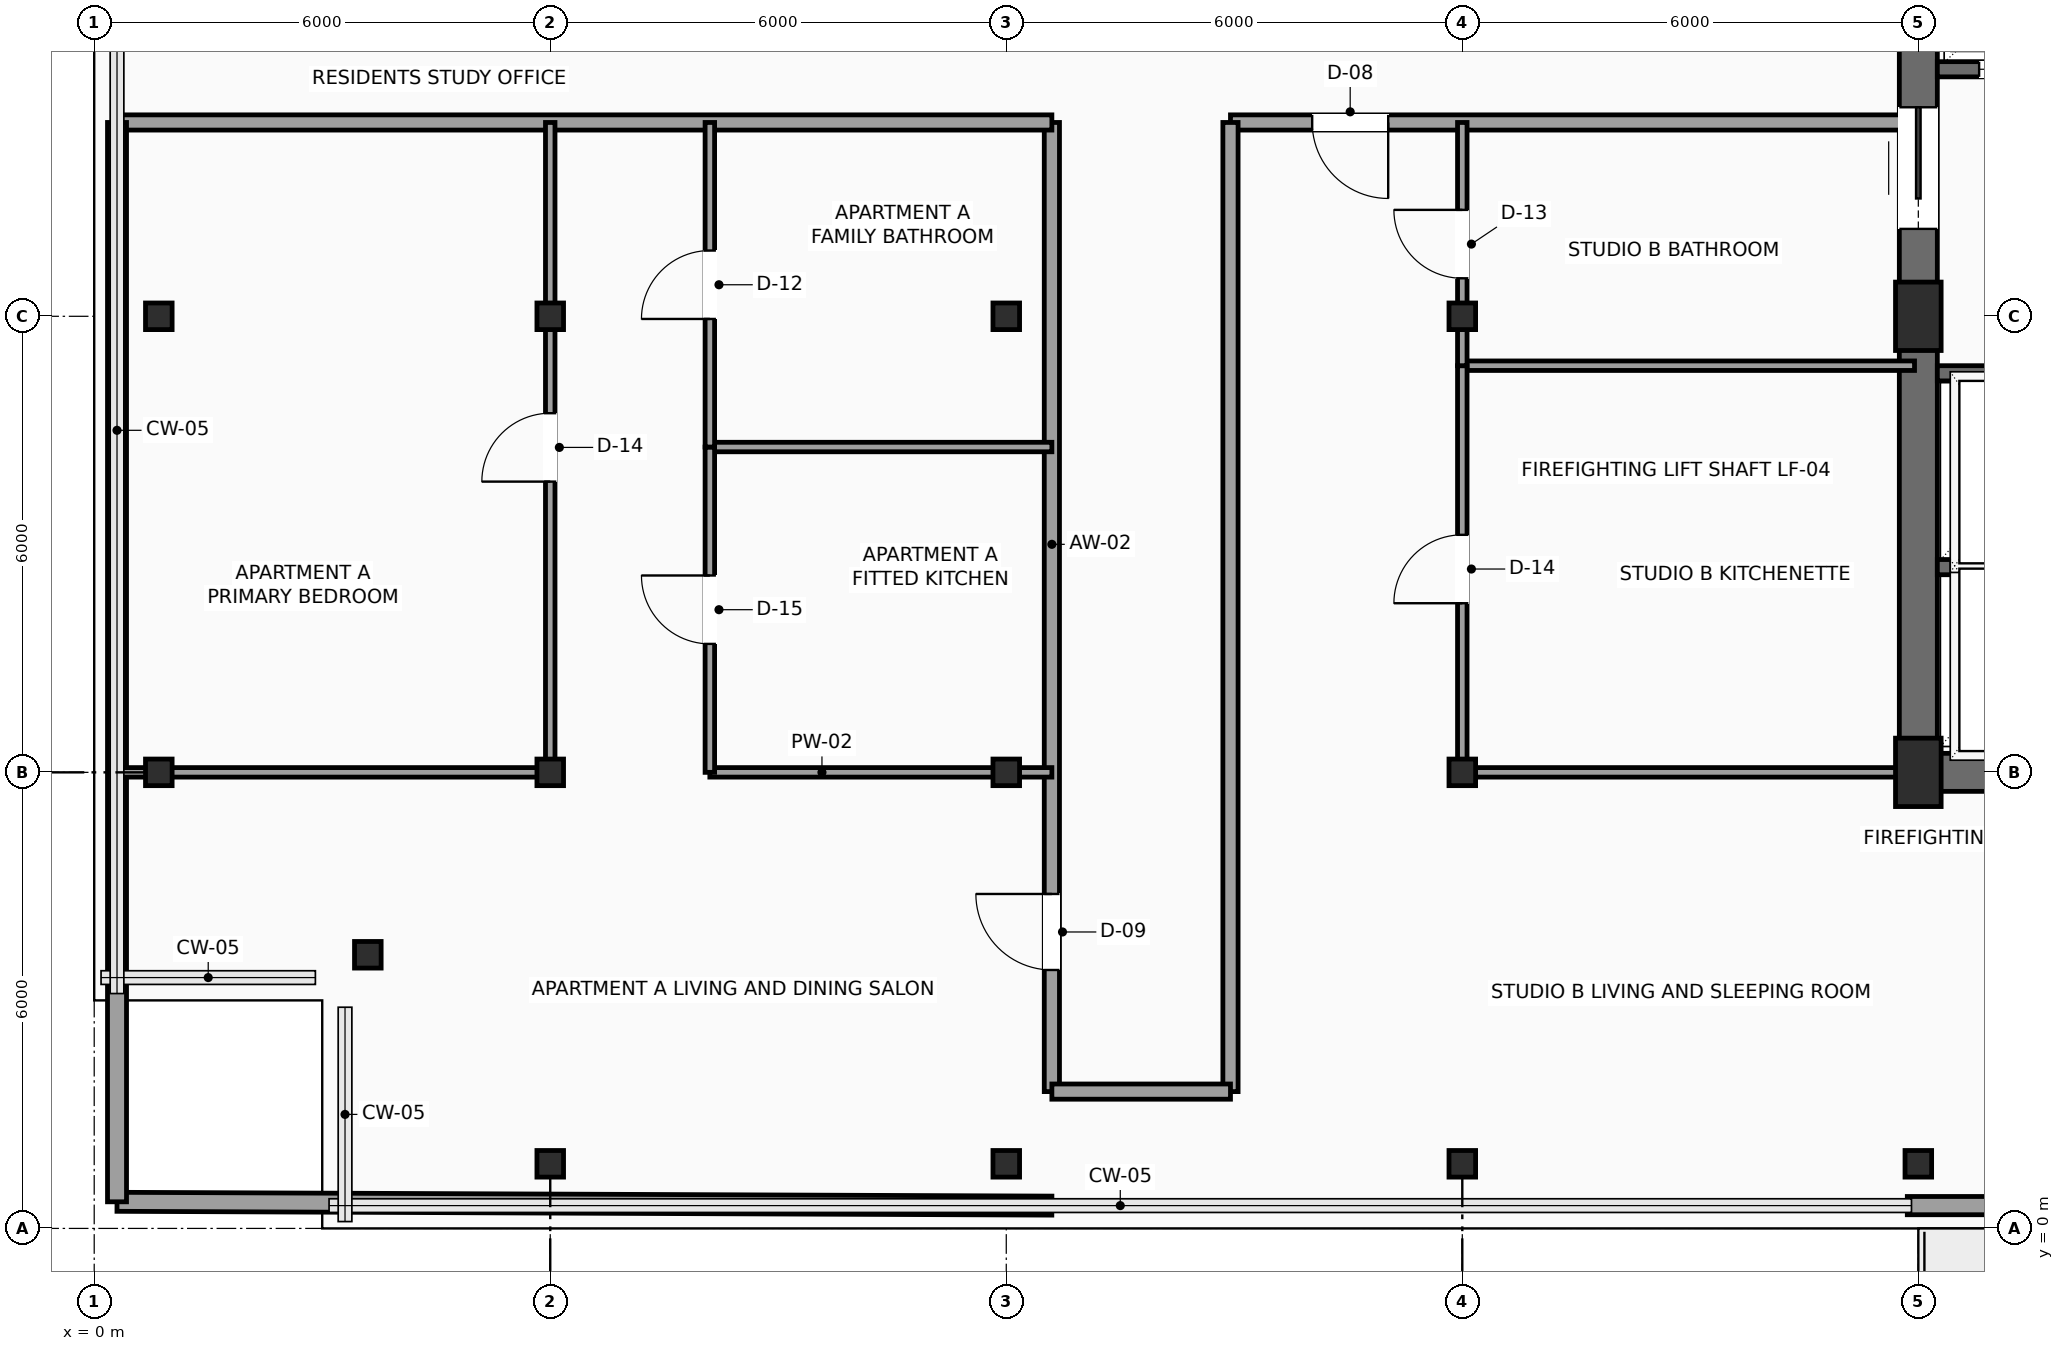
"""IFC4 building model, lengths in metres.
Left out: names, types, materials, properties, quantities, classifications, styles, units other than length and angle.
Written with IfcOpenShell. Run it as: python <this file> out.ifc"""

import sys

from ifc_helpers import new_model, si_unit, direction, frame, frame_2d, origin, origin_2d, place, context, subcontext, project, spatial, rectangle, hollow_rectangle, extrude, element, fill, save


model = new_model("IFC4")
c1 = context("Model", 3, precision=1e-05, world=origin(), true_north=direction((0.0, 1.0)))
c2 = subcontext(c1, "Body", "Model", "MODEL_VIEW")
j1 = project(units=[si_unit("LENGTHUNIT", "METRE"), si_unit("PLANEANGLEUNIT", "RADIAN")], contexts=[c1])
p1 = place(None, origin())
s1 = spatial("IfcSite", under=j1, at=p1, CompositionType="ELEMENT")
p2 = place(p1, origin())
s2 = spatial("IfcBuilding", under=s1, at=p2, CompositionType="ELEMENT")
p3 = place(p2, frame((0.0, 0.0, 243.2)))
s3 = spatial("IfcBuildingStorey", under=s2, at=p3, CompositionType="ELEMENT", Elevation=243.2)
for number, where, z_axis, x_axis in (
    (1, (24.0, 6.0, 0.0), (0.0, 0.0, 1.0), (1.0, 0.0, 0.0)),
    (2, (24.0, 12.0, 0.0), (0.0, 0.0, 1.0), (1.0, 0.0, 0.0)),
):
    element("IfcColumn", number, at=place(p3, frame(where, z_axis=z_axis, x_axis=x_axis)), inside=s3, PredefinedType="COLUMN", context=c2, shape_type="SweptSolid", body=[
        extrude(rectangle(XDim=0.6, YDim=0.9, at=origin_2d()), origin(), (0.0, 0.0, 1.0), 3.5),
    ])
for number, where, z_axis, x_axis in (
    (3, (3.6, 3.6, 0.0), (0.0, 0.0, 1.0), (1.0, 0.0, 0.0)),
    (4, (0.85, 6.0, 0.0), (0.0, 0.0, 1.0), (1.0, 0.0, 0.0)),
    (5, (0.85, 12.0, 0.0), (0.0, 0.0, 1.0), (1.0, 0.0, 0.0)),
    (6, (6.0, 0.85, 0.0), (0.0, 0.0, 1.0), (1.0, 0.0, 0.0)),
    (7, (6.0, 6.0, 0.0), (0.0, 0.0, 1.0), (1.0, 0.0, 0.0)),
    (8, (6.0, 12.0, 0.0), (0.0, 0.0, 1.0), (1.0, 0.0, 0.0)),
    (9, (12.0, 0.85, 0.0), (0.0, 0.0, 1.0), (1.0, 0.0, 0.0)),
    (10, (12.0, 6.0, 0.0), (0.0, 0.0, 1.0), (1.0, 0.0, 0.0)),
    (11, (12.0, 12.0, 0.0), (0.0, 0.0, 1.0), (1.0, 0.0, 0.0)),
    (12, (18.0, 0.85, 0.0), (0.0, 0.0, 1.0), (1.0, 0.0, 0.0)),
    (13, (18.0, 6.0, 0.0), (0.0, 0.0, 1.0), (1.0, 0.0, 0.0)),
    (14, (18.0, 12.0, 0.0), (0.0, 0.0, 1.0), (1.0, 0.0, 0.0)),
    (15, (24.0, 0.85, 0.0), (0.0, 0.0, 1.0), (1.0, 0.0, 0.0)),
):
    element("IfcColumn", number, at=place(p3, frame(where, z_axis=z_axis, x_axis=x_axis)), inside=s3, PredefinedType="COLUMN", context=c2, shape_type="SweptSolid", body=[
        extrude(hollow_rectangle(XDim=0.35, YDim=0.35, WallThickness=0.016, InnerFilletRadius=0.016, OuterFilletRadius=0.032, at=origin_2d()), origin(), (0.0, 0.0, 1.0), 3.5),
    ])
p4 = place(p3, frame((33.145, 0.3, 0.0), z_axis=(0.0, 0.0, 1.0), x_axis=(-1.0, 0.0, 0.0)))
e16 = element("IfcWall", 16, at=p4, inside=s3, PredefinedType="SOLIDWALL", context=c2, shape_type="SweptSolid", body=[
    extrude(rectangle(XDim=9.29, YDim=0.24, at=frame_2d((4.645, 0.0))), origin(), (0.0, 0.0, 1.0), 3.3),
])
p5 = place(p4, frame((3.945, 0.0, 0.0)))
e17 = element("IfcOpeningElement", 17, at=p5, cuts=e16, PredefinedType="OPENING", context=c2, shape_type="SweptSolid", body=[
    extrude(rectangle(XDim=1.05, YDim=2.2, at=frame_2d((0.525, 1.1))), frame((0.0, 0.13, 0.0), z_axis=(0.0, -1.0, 0.0), x_axis=(1.0, 0.0, 0.0)), (0.0, 0.0, 1.0), 0.26),
])
p6 = place(p4, frame((5.345, 0.0, 0.6)))
e18 = element("IfcOpeningElement", 18, at=p6, cuts=e16, PredefinedType="OPENING", context=c2, shape_type="SweptSolid", body=[
    extrude(rectangle(XDim=2.7, YDim=2.3, at=frame_2d((1.35, 1.15))), frame((0.0, 0.13, 0.0), z_axis=(0.0, -1.0, 0.0), x_axis=(1.0, 0.0, 0.0)), (0.0, 0.0, 1.0), 0.26),
])
p7 = place(p4, frame((1.4, 0.0, 0.6)))
e19 = element("IfcOpeningElement", 19, at=p7, cuts=e16, PredefinedType="OPENING", context=c2, shape_type="SweptSolid", body=[
    extrude(rectangle(XDim=0.9, YDim=2.2, at=frame_2d((0.45, 1.1))), frame((0.0, 0.13, 0.0), z_axis=(0.0, -1.0, 0.0), x_axis=(1.0, 0.0, 0.0)), (0.0, 0.0, 1.0), 0.26),
])
p8 = place(p3, frame((24.0, 6.0, 0.0), z_axis=(0.0, 0.0, 1.0), x_axis=(1.0, 0.0, 0.0)))
e20 = element("IfcWall", 20, at=p8, inside=s3, PredefinedType="SHEAR", context=c2, shape_type="SweptSolid", body=[
    extrude(rectangle(XDim=9.6, YDim=0.5, at=frame_2d((4.8, 0.0))), origin(), (0.0, 0.0, 1.0), 3.3),
])
p9 = place(p3, frame((24.0, 6.0, 0.0), z_axis=(0.0, 0.0, 1.0), x_axis=(0.0, 1.0, 0.0)))
e21 = element("IfcWall", 21, at=p9, inside=s3, PredefinedType="SHEAR", context=c2, shape_type="SweptSolid", body=[
    extrude(rectangle(XDim=12.0, YDim=0.5, at=frame_2d((6.0, 0.0))), origin(), (0.0, 0.0, 1.0), 3.3),
])
p10 = place(p9, frame((7.15, 0.0, 0.0)))
e22 = element("IfcOpeningElement", 22, at=p10, cuts=e21, PredefinedType="OPENING", context=c2, shape_type="SweptSolid", body=[
    extrude(rectangle(XDim=1.6, YDim=2.3, at=frame_2d((0.8, 1.15))), frame((0.0, 0.26, 0.0), z_axis=(0.0, -1.0, 0.0), x_axis=(1.0, 0.0, 0.0)), (0.0, 0.0, 1.0), 0.52),
])
for number, where, z_axis, x_axis in (
    (23, (24.25, 8.7, 0.0), (0.0, 0.0, 1.0), (1.0, 0.0, 0.0)),
    (24, (24.25, 11.25, 0.0), (0.0, 0.0, 1.0), (1.0, 0.0, 0.0)),
):
    element("IfcWall", number, at=place(p3, frame(where, z_axis=z_axis, x_axis=x_axis)), inside=s3, PredefinedType="SHEAR", context=c2, shape_type="SweptSolid", body=[
        extrude(rectangle(XDim=2.17, YDim=0.2, at=frame_2d((1.085, 0.0))), origin(), (0.0, 0.0, 1.0), 3.3),
    ])
p11 = place(p3, frame((24.25, 15.25, 0.0), z_axis=(0.0, 0.0, 1.0), x_axis=(1.0, 0.0, 0.0)))
e25 = element("IfcWall", 25, at=p11, inside=s3, PredefinedType="SHEAR", context=c2, shape_type="SweptSolid", body=[
    extrude(rectangle(XDim=5.2, YDim=0.2, at=frame_2d((2.6, 0.0))), origin(), (0.0, 0.0, 1.0), 3.3),
])
p12 = place(p11, frame((0.55, 0.0, 0.0)))
e26 = element("IfcOpeningElement", 26, at=p12, cuts=e25, PredefinedType="OPENING", context=c2, shape_type="SweptSolid", body=[
    extrude(rectangle(XDim=1.2, YDim=2.2, at=frame_2d((0.6, 1.1))), frame((0.0, 0.11, 0.0), z_axis=(0.0, -1.0, 0.0), x_axis=(1.0, 0.0, 0.0)), (0.0, 0.0, 1.0), 0.22),
])
p13 = place(p11, frame((3.15, 0.0, 0.0)))
e27 = element("IfcOpeningElement", 27, at=p13, cuts=e25, PredefinedType="OPENING", context=c2, shape_type="SweptSolid", body=[
    extrude(rectangle(XDim=1.2, YDim=2.2, at=frame_2d((0.6, 1.1))), frame((0.0, 0.11, 0.0), z_axis=(0.0, -1.0, 0.0), x_axis=(1.0, 0.0, 0.0)), (0.0, 0.0, 1.0), 0.22),
])
p14 = place(p3, frame((12.6, 1.8, 0.0), z_axis=(0.0, 0.0, 1.0), x_axis=(0.0, 1.0, 0.0)))
e28 = element("IfcWall", 28, at=p14, inside=s3, PredefinedType="PARTITIONING", context=c2, shape_type="SweptSolid", body=[
    extrude(rectangle(XDim=12.75, YDim=0.2, at=frame_2d((6.375, 0.0))), origin(), (0.0, 0.0, 1.0), 3.3),
])
p15 = place(p14, frame((1.6, 0.0, 0.0)))
e29 = element("IfcOpeningElement", 29, at=p15, cuts=e28, PredefinedType="OPENING", context=c2, shape_type="SweptSolid", body=[
    extrude(rectangle(XDim=1.0, YDim=2.2, at=frame_2d((0.5, 1.1))), frame((0.0, 0.11, 0.0), z_axis=(0.0, -1.0, 0.0), x_axis=(1.0, 0.0, 0.0)), (0.0, 0.0, 1.0), 0.22),
])
p16 = place(p3, frame((12.6, 14.55, 0.0), z_axis=(0.0, 0.0, 1.0), x_axis=(-1.0, 0.0, 0.0)))
e30 = element("IfcWall", 30, at=p16, inside=s3, PredefinedType="PARTITIONING", context=c2, shape_type="SweptSolid", body=[
    extrude(rectangle(XDim=12.3, YDim=0.2, at=frame_2d((6.15, 0.0))), origin(), (0.0, 0.0, 1.0), 3.3),
])
p17 = place(p3, frame((23.95, 14.55, 0.0), z_axis=(0.0, 0.0, 1.0), x_axis=(-1.0, 0.0, 0.0)))
e31 = element("IfcWall", 31, at=p17, inside=s3, PredefinedType="PARTITIONING", context=c2, shape_type="SweptSolid", body=[
    extrude(rectangle(XDim=9.0, YDim=0.2, at=frame_2d((4.5, 0.0))), origin(), (0.0, 0.0, 1.0), 3.3),
])
p18 = place(p17, frame((6.925, 0.0, 0.0)))
e32 = element("IfcOpeningElement", 32, at=p18, cuts=e31, PredefinedType="OPENING", context=c2, shape_type="SweptSolid", body=[
    extrude(rectangle(XDim=1.0, YDim=2.2, at=frame_2d((0.5, 1.1))), frame((0.0, 0.11, 0.0), z_axis=(0.0, -1.0, 0.0), x_axis=(1.0, 0.0, 0.0)), (0.0, 0.0, 1.0), 0.22),
])
p19 = place(p3, frame((14.95, 14.55, 0.0), z_axis=(0.0, 0.0, 1.0), x_axis=(0.0, -1.0, 0.0)))
e33 = element("IfcWall", 33, at=p19, inside=s3, PredefinedType="PARTITIONING", context=c2, shape_type="SweptSolid", body=[
    extrude(rectangle(XDim=12.75, YDim=0.2, at=frame_2d((6.375, 0.0))), origin(), (0.0, 0.0, 1.0), 3.3),
])
p20 = place(p3, frame((14.95, 1.8, 0.0), z_axis=(0.0, 0.0, 1.0), x_axis=(-1.0, 0.0, 0.0)))
e34 = element("IfcWall", 34, at=p20, inside=s3, PredefinedType="PARTITIONING", context=c2, shape_type="SweptSolid", body=[
    extrude(rectangle(XDim=2.35, YDim=0.2, at=frame_2d((1.175, 0.0))), origin(), (0.0, 0.0, 1.0), 3.3),
])
p21 = place(p3, frame((0.3, 0.35, 0.0), z_axis=(0.0, 0.0, 1.0), x_axis=(0.999991721746, -0.00406896058, 0.0)))
e35 = element("IfcWall", 35, at=p21, inside=s3, PredefinedType="PARTITIONING", context=c2, shape_type="SweptSolid", body=[
    extrude(rectangle(XDim=12.3, YDim=0.25, at=frame_2d((6.15, 0.0))), origin(), (0.0, 0.0, 1.0), 3.3),
])
p22 = place(p3, frame((0.3, 0.35, 0.0), z_axis=(0.0, 0.0, 1.0), x_axis=(0.0, 1.0, 0.0)))
e36 = element("IfcWall", 36, at=p22, inside=s3, PredefinedType="PARTITIONING", context=c2, shape_type="SweptSolid", body=[
    extrude(rectangle(XDim=14.2, YDim=0.25, at=frame_2d((7.1, 0.0))), origin(), (0.0, 0.0, 1.0), 3.3),
])
p23 = place(p3, frame((8.1, 6.0, 0.0), z_axis=(0.0, 0.0, 1.0), x_axis=(1.0, 0.0, 0.0)))
e37 = element("IfcWall", 37, at=p23, inside=s3, PredefinedType="PARTITIONING", context=c2, shape_type="SweptSolid", body=[
    extrude(rectangle(XDim=4.5, YDim=0.125, at=frame_2d((2.25, 0.0))), origin(), (0.0, 0.0, 1.0), 2.992),
])
p24 = place(p3, frame((8.1, 10.28, 0.0), z_axis=(0.0, 0.0, 1.0), x_axis=(1.0, 0.0, 0.0)))
e38 = element("IfcWall", 38, at=p24, inside=s3, PredefinedType="PARTITIONING", context=c2, shape_type="SweptSolid", body=[
    extrude(rectangle(XDim=4.5, YDim=0.125, at=frame_2d((2.25, 0.0))), origin(), (0.0, 0.0, 1.0), 3.3),
])
p25 = place(p3, frame((8.1, 6.0, 0.0), z_axis=(0.0, 0.0, 1.0), x_axis=(0.0, 1.0, 0.0)))
e39 = element("IfcWall", 39, at=p25, inside=s3, PredefinedType="PARTITIONING", context=c2, shape_type="SweptSolid", body=[
    extrude(rectangle(XDim=4.28, YDim=0.125, at=frame_2d((2.14, 0.0))), origin(), (0.0, 0.0, 1.0), 3.3),
])
p26 = place(p25, frame((1.69, 0.0, 0.0)))
e40 = element("IfcOpeningElement", 40, at=p26, cuts=e39, PredefinedType="OPENING", context=c2, shape_type="SweptSolid", body=[
    extrude(rectangle(XDim=0.9, YDim=2.1, at=frame_2d((0.45, 1.05))), frame((0.0, 0.073, 0.0), z_axis=(0.0, -1.0, 0.0), x_axis=(1.0, 0.0, 0.0)), (0.0, 0.0, 1.0), 0.145),
])
p27 = place(p3, frame((8.1, 10.28, 0.0), z_axis=(0.0, 0.0, 1.0), x_axis=(0.0, 1.0, 0.0)))
e41 = element("IfcWall", 41, at=p27, inside=s3, PredefinedType="PARTITIONING", context=c2, shape_type="SweptSolid", body=[
    extrude(rectangle(XDim=4.27, YDim=0.125, at=frame_2d((2.135, 0.0))), origin(), (0.0, 0.0, 1.0), 3.3),
])
p28 = place(p27, frame((1.685, 0.0, 0.0)))
e42 = element("IfcOpeningElement", 42, at=p28, cuts=e41, PredefinedType="OPENING", context=c2, shape_type="SweptSolid", body=[
    extrude(rectangle(XDim=0.9, YDim=2.1, at=frame_2d((0.45, 1.05))), frame((0.0, 0.073, 0.0), z_axis=(0.0, -1.0, 0.0), x_axis=(1.0, 0.0, 0.0)), (0.0, 0.0, 1.0), 0.145),
])
p29 = place(p3, frame((0.3, 6.0, 0.0), z_axis=(0.0, 0.0, 1.0), x_axis=(1.0, 0.0, 0.0)))
e43 = element("IfcWall", 43, at=p29, inside=s3, PredefinedType="PARTITIONING", context=c2, shape_type="SweptSolid", body=[
    extrude(rectangle(XDim=5.7, YDim=0.125, at=frame_2d((2.85, 0.0))), origin(), (0.0, 0.0, 1.0), 2.992),
])
p30 = place(p3, frame((6.0, 6.0, 0.0), z_axis=(0.0, 0.0, 1.0), x_axis=(0.0, 1.0, 0.0)))
e44 = element("IfcWall", 44, at=p30, inside=s3, PredefinedType="PARTITIONING", context=c2, shape_type="SweptSolid", body=[
    extrude(rectangle(XDim=8.55, YDim=0.125, at=frame_2d((4.275, 0.0))), origin(), (0.0, 0.0, 1.0), 2.992),
])
p31 = place(p30, frame((3.825, 0.0, 0.0)))
e45 = element("IfcOpeningElement", 45, at=p31, cuts=e44, PredefinedType="OPENING", context=c2, shape_type="SweptSolid", body=[
    extrude(rectangle(XDim=0.9, YDim=2.1, at=frame_2d((0.45, 1.05))), frame((0.0, 0.073, 0.0), z_axis=(0.0, -1.0, 0.0), x_axis=(1.0, 0.0, 0.0)), (0.0, 0.0, 1.0), 0.145),
])
p32 = place(p3, frame((18.0, 6.0, 0.0), z_axis=(0.0, 0.0, 1.0), x_axis=(1.0, 0.0, 0.0)))
e46 = element("IfcWall", 46, at=p32, inside=s3, PredefinedType="PARTITIONING", context=c2, shape_type="SweptSolid", body=[
    extrude(rectangle(XDim=5.95, YDim=0.125, at=frame_2d((2.975, 0.0))), origin(), (0.0, 0.0, 1.0), 2.992),
])
p33 = place(p3, frame((18.0, 11.35, 0.0), z_axis=(0.0, 0.0, 1.0), x_axis=(1.0, 0.0, 0.0)))
e47 = element("IfcWall", 47, at=p33, inside=s3, PredefinedType="PARTITIONING", context=c2, shape_type="SweptSolid", body=[
    extrude(rectangle(XDim=5.95, YDim=0.125, at=frame_2d((2.975, 0.0))), origin(), (0.0, 0.0, 1.0), 3.3),
])
p34 = place(p3, frame((18.0, 6.0, 0.0), z_axis=(0.0, 0.0, 1.0), x_axis=(0.0, 1.0, 0.0)))
e48 = element("IfcWall", 48, at=p34, inside=s3, PredefinedType="PARTITIONING", context=c2, shape_type="SweptSolid", body=[
    extrude(rectangle(XDim=5.35, YDim=0.125, at=frame_2d((2.675, 0.0))), origin(), (0.0, 0.0, 1.0), 2.992),
])
p35 = place(p34, frame((2.225, 0.0, 0.0)))
e49 = element("IfcOpeningElement", 49, at=p35, cuts=e48, PredefinedType="OPENING", context=c2, shape_type="SweptSolid", body=[
    extrude(rectangle(XDim=0.9, YDim=2.1, at=frame_2d((0.45, 1.05))), frame((0.0, 0.073, 0.0), z_axis=(0.0, -1.0, 0.0), x_axis=(1.0, 0.0, 0.0)), (0.0, 0.0, 1.0), 0.145),
])
p36 = place(p3, frame((18.0, 11.35, 0.0), z_axis=(0.0, 0.0, 1.0), x_axis=(0.0, 1.0, 0.0)))
e50 = element("IfcWall", 50, at=p36, inside=s3, PredefinedType="PARTITIONING", context=c2, shape_type="SweptSolid", body=[
    extrude(rectangle(XDim=3.2, YDim=0.125, at=frame_2d((1.6, 0.0))), origin(), (0.0, 0.0, 1.0), 2.992),
])
p37 = place(p36, frame((1.15, 0.0, 0.0)))
e51 = element("IfcOpeningElement", 51, at=p37, cuts=e50, PredefinedType="OPENING", context=c2, shape_type="SweptSolid", body=[
    extrude(rectangle(XDim=0.9, YDim=2.1, at=frame_2d((0.45, 1.05))), frame((0.0, 0.073, 0.0), z_axis=(0.0, -1.0, 0.0), x_axis=(1.0, 0.0, 0.0)), (0.0, 0.0, 1.0), 0.145),
])
p38 = place(p10, origin())
e52 = element("IfcDoor", 52, at=p38, inside=s3, OperationType="DOUBLE_DOOR_SLIDING", PredefinedType="DOOR", context=c2, shape_type="SweptSolid", body=[
    extrude(rectangle(XDim=1.6, YDim=2.3, at=frame_2d((0.8, 1.15))), frame((0.0, 0.025, 0.0), z_axis=(0.0, -1.0, 0.0), x_axis=(1.0, 0.0, 0.0)), (0.0, 0.0, 1.0), 0.05),
])
fill(e22, e52)
p39 = place(p12, origin())
e53 = element("IfcDoor", 53, at=p39, inside=s3, OperationType="SLIDING_TO_RIGHT", PredefinedType="DOOR", context=c2, shape_type="SweptSolid", body=[
    extrude(rectangle(XDim=1.2, YDim=2.2, at=frame_2d((0.6, 1.1))), frame((0.0, 0.025, 0.0), z_axis=(0.0, -1.0, 0.0), x_axis=(1.0, 0.0, 0.0)), (0.0, 0.0, 1.0), 0.05),
])
fill(e26, e53)
p40 = place(p15, origin())
e54 = element("IfcDoor", 54, at=p40, inside=s3, OperationType="SINGLE_SWING_RIGHT", PredefinedType="DOOR", context=c2, shape_type="SweptSolid", body=[
    extrude(rectangle(XDim=1.0, YDim=2.2, at=frame_2d((0.5, 1.1))), frame((0.0, 0.025, 0.0), z_axis=(0.0, -1.0, 0.0), x_axis=(1.0, 0.0, 0.0)), (0.0, 0.0, 1.0), 0.05),
])
fill(e29, e54)
p41 = place(p18, origin())
e55 = element("IfcDoor", 55, at=p41, inside=s3, OperationType="SINGLE_SWING_LEFT", PredefinedType="DOOR", context=c2, shape_type="SweptSolid", body=[
    extrude(rectangle(XDim=1.0, YDim=2.2, at=frame_2d((0.5, 1.1))), frame((0.0, 0.025, 0.0), z_axis=(0.0, -1.0, 0.0), x_axis=(1.0, 0.0, 0.0)), (0.0, 0.0, 1.0), 0.05),
])
fill(e32, e55)
p42 = place(p26, origin())
e56 = element("IfcDoor", 56, at=p42, inside=s3, OperationType="SINGLE_SWING_RIGHT", PredefinedType="DOOR", context=c2, shape_type="SweptSolid", body=[
    extrude(rectangle(XDim=0.9, YDim=2.1, at=frame_2d((0.45, 1.05))), frame((0.0, 0.025, 0.0), z_axis=(0.0, -1.0, 0.0), x_axis=(1.0, 0.0, 0.0)), (0.0, 0.0, 1.0), 0.05),
])
fill(e40, e56)
p43 = place(p28, origin())
e57 = element("IfcDoor", 57, at=p43, inside=s3, OperationType="SINGLE_SWING_LEFT", PredefinedType="DOOR", context=c2, shape_type="SweptSolid", body=[
    extrude(rectangle(XDim=0.9, YDim=2.1, at=frame_2d((0.45, 1.05))), frame((0.0, 0.025, 0.0), z_axis=(0.0, -1.0, 0.0), x_axis=(1.0, 0.0, 0.0)), (0.0, 0.0, 1.0), 0.05),
])
fill(e42, e57)
p44 = place(p31, origin())
e58 = element("IfcDoor", 58, at=p44, inside=s3, OperationType="SINGLE_SWING_LEFT", PredefinedType="DOOR", context=c2, shape_type="SweptSolid", body=[
    extrude(rectangle(XDim=0.9, YDim=2.1, at=frame_2d((0.45, 1.05))), frame((0.0, 0.025, 0.0), z_axis=(0.0, -1.0, 0.0), x_axis=(1.0, 0.0, 0.0)), (0.0, 0.0, 1.0), 0.05),
])
fill(e45, e58)
p45 = place(p35, origin())
e59 = element("IfcDoor", 59, at=p45, inside=s3, OperationType="SINGLE_SWING_LEFT", PredefinedType="DOOR", context=c2, shape_type="SweptSolid", body=[
    extrude(rectangle(XDim=0.9, YDim=2.1, at=frame_2d((0.45, 1.05))), frame((0.0, 0.025, 0.0), z_axis=(0.0, -1.0, 0.0), x_axis=(1.0, 0.0, 0.0)), (0.0, 0.0, 1.0), 0.05),
])
fill(e49, e59)
p46 = place(p37, origin())
e60 = element("IfcDoor", 60, at=p46, inside=s3, OperationType="SINGLE_SWING_RIGHT", PredefinedType="DOOR", context=c2, shape_type="SweptSolid", body=[
    extrude(rectangle(XDim=0.9, YDim=2.1, at=frame_2d((0.45, 1.05))), frame((0.0, 0.025, 0.0), z_axis=(0.0, -1.0, 0.0), x_axis=(1.0, 0.0, 0.0)), (0.0, 0.0, 1.0), 0.05),
])
fill(e51, e60)
save(model, sys.argv[1])
